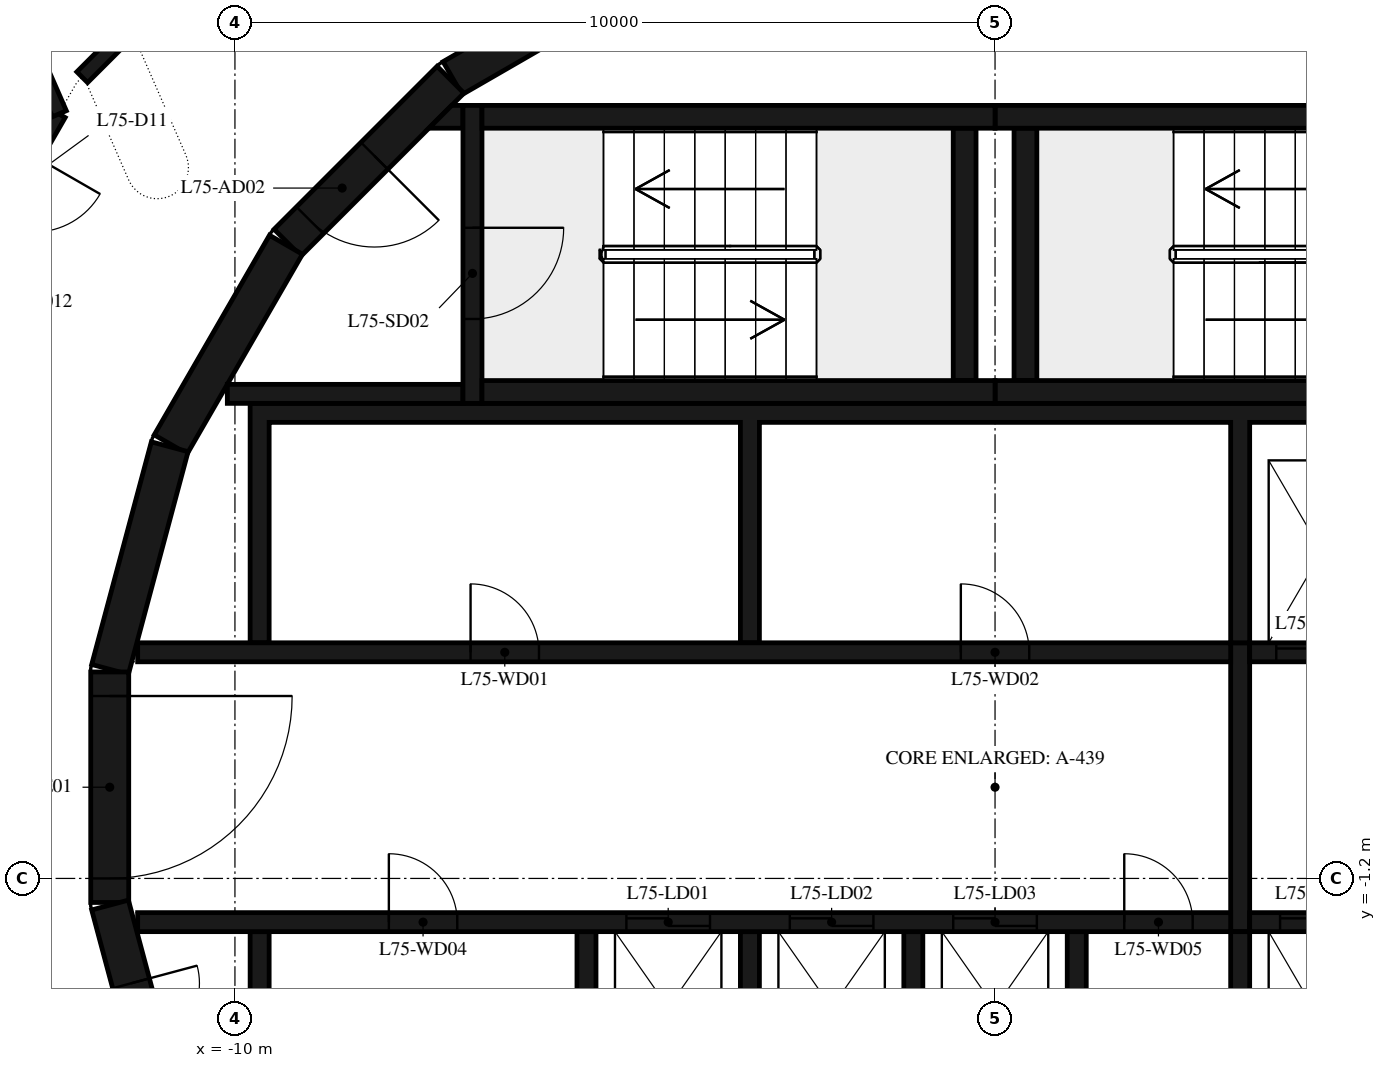
"""IFC4 building model, lengths in metres.
Left out: names, types, materials, properties, quantities, classifications, styles, units other than length and angle.
Written with IfcOpenShell. Run it as: python <this file> out.ifc"""

import sys

from ifc_helpers import new_model, si_unit, direction, frame, frame_2d, origin, place, context, subcontext, project, spatial, polyline, rectangle, outline, extrude, element, fill, save


model = new_model("IFC4")
c1 = context("Model", 3, precision=1e-05, world=origin(), true_north=direction((0.0, 1.0)))
c2 = subcontext(c1, "Body", "Model", "MODEL_VIEW")
j1 = project(units=[si_unit("LENGTHUNIT", "METRE"), si_unit("PLANEANGLEUNIT", "RADIAN")], contexts=[c1])
p1 = place(None, origin())
s1 = spatial("IfcSite", under=j1, at=p1, CompositionType="ELEMENT")
p2 = place(p1, origin())
s2 = spatial("IfcBuilding", under=s1, at=p2, CompositionType="ELEMENT")
p3 = place(p2, frame((0.0, 0.0, 291.4)))
s3 = spatial("IfcBuildingStorey", under=s2, at=p3, CompositionType="ELEMENT", Elevation=291.4)
p4 = place(p3, frame((-4.51, 10.845, 0.0), z_axis=(0.0, 0.0, 1.0), x_axis=(-0.865975092491, -0.500087131594, 0.0)))
e1 = element("IfcWall", 1, at=p4, inside=s3, PredefinedType="SHEAR", context=c2, shape_type="SweptSolid", body=[
    extrude(rectangle(XDim=3.033, YDim=0.5, at=frame_2d((1.516, 0.0))), origin(), (0.0, 0.0, 1.0), 6.35),
])
p5 = place(p3, frame((-7.164, 9.308, 0.0), z_axis=(0.0, 0.0, 1.0), x_axis=(-0.707106781187, -0.707106781187, 0.0)))
e2 = element("IfcWall", 2, at=p5, inside=s3, PredefinedType="SHEAR", context=c2, shape_type="SweptSolid", body=[
    extrude(rectangle(XDim=3.032, YDim=0.5, at=frame_2d((1.516, 0.0))), origin(), (0.0, 0.0, 1.0), 6.35),
])
p6 = place(p5, frame((1.416, 0.0, 0.0)))
e3 = element("IfcOpeningElement", 3, at=p6, cuts=e2, PredefinedType="OPENING", context=c2, shape_type="SweptSolid", body=[
    extrude(rectangle(XDim=1.2, YDim=2.1, at=frame_2d((0.6, 1.05))), frame((0.0, 0.26, 0.0), z_axis=(0.0, -1.0, 0.0), x_axis=(1.0, 0.0, 0.0)), (0.0, 0.0, 1.0), 0.52),
])
for number, where, z_axis, x_axis in (
    (4, (-9.329, 7.137, 0.0), (0.0, 0.0, 1.0), (-0.5, -0.866, 0.0)),
    (5, (-10.858, 4.479, 0.0), (0.0, 0.0, 1.0), (-0.259, -0.966, 0.0)),
):
    element("IfcWall", number, at=place(p3, frame(where, z_axis=z_axis, x_axis=x_axis)), inside=s3, PredefinedType="SHEAR", context=c2, shape_type="SweptSolid", body=[
        extrude(rectangle(XDim=3.033, YDim=0.5, at=frame_2d((1.516, 0.0))), origin(), (0.0, 0.0, 1.0), 6.35),
    ])
p7 = place(p3, frame((-11.647, 1.516, 0.0), z_axis=(0.0, 0.0, 1.0), x_axis=(0.0, -1.0, 0.0)))
e6 = element("IfcWall", 6, at=p7, inside=s3, PredefinedType="SHEAR", context=c2, shape_type="SweptSolid", body=[
    extrude(rectangle(XDim=3.033, YDim=0.5, at=frame_2d((1.516, 0.0))), origin(), (0.0, 0.0, 1.0), 6.35),
])
p8 = place(p7, frame((0.316, 0.0, 0.0)))
e7 = element("IfcOpeningElement", 7, at=p8, cuts=e6, PredefinedType="OPENING", context=c2, shape_type="SweptSolid", body=[
    extrude(rectangle(XDim=2.4, YDim=2.1, at=frame_2d((1.2, 1.05))), frame((0.0, 0.26, 0.0), z_axis=(0.0, -1.0, 0.0), x_axis=(1.0, 0.0, 0.0)), (0.0, 0.0, 1.0), 0.52),
])
p9 = place(p3, frame((-11.643, -1.55, 0.0), z_axis=(0.0, 0.0, 1.0), x_axis=(0.258734743916, -0.965948410781, 0.0)))
e8 = element("IfcWall", 8, at=p9, inside=s3, PredefinedType="SHEAR", context=c2, shape_type="SweptSolid", body=[
    extrude(rectangle(XDim=3.033, YDim=0.5, at=frame_2d((1.516, 0.0))), origin(), (0.0, 0.0, 1.0), 6.35),
])
p10 = place(p9, frame((1.066, 0.0, 0.0)))
e9 = element("IfcOpeningElement", 9, at=p10, cuts=e8, PredefinedType="OPENING", context=c2, shape_type="SweptSolid", body=[
    extrude(rectangle(XDim=0.9, YDim=2.1, at=frame_2d((0.45, 1.05))), frame((0.0, 0.26, 0.0), z_axis=(0.0, -1.0, 0.0), x_axis=(1.0, 0.0, 0.0)), (0.0, 0.0, 1.0), 0.52),
])
for number, where, z_axis, x_axis in (
    (10, (0.0, 5.2, 0.0), (0.0, 0.0, 1.0), (1.0, 0.0, 0.0)),
    (11, (0.0, 8.82, 0.0), (0.0, 0.0, 1.0), (1.0, 0.0, 0.0)),
):
    element("IfcWall", number, at=place(p3, frame(where, z_axis=z_axis, x_axis=x_axis)), inside=s3, PredefinedType="SHEAR", context=c2, shape_type="SweptSolid", body=[
        extrude(rectangle(XDim=6.75, YDim=0.3, at=frame_2d((3.375, 0.0))), origin(), (0.0, 0.0, 1.0), 6.35),
    ])
p11 = place(p3, frame((0.4, 5.35, 0.0), z_axis=(0.0, 0.0, 1.0), x_axis=(0.0, 1.0, 0.0)))
e12 = element("IfcWall", 12, at=p11, inside=s3, PredefinedType="SHEAR", context=c2, shape_type="SweptSolid", body=[
    extrude(rectangle(XDim=3.32, YDim=0.3, at=frame_2d((1.66, 0.0))), origin(), (0.0, 0.0, 1.0), 6.35),
])
for number, where, z_axis, x_axis in (
    (13, (-6.75, 5.2, 0.0), (0.0, 0.0, 1.0), (1.0, 0.0, 0.0)),
    (14, (-6.75, 8.82, 0.0), (0.0, 0.0, 1.0), (1.0, 0.0, 0.0)),
):
    element("IfcWall", number, at=place(p3, frame(where, z_axis=z_axis, x_axis=x_axis)), inside=s3, PredefinedType="SHEAR", context=c2, shape_type="SweptSolid", body=[
        extrude(rectangle(XDim=6.75, YDim=0.3, at=frame_2d((3.375, 0.0))), origin(), (0.0, 0.0, 1.0), 6.35),
    ])
p12 = place(p3, frame((-0.4, 5.35, 0.0), z_axis=(0.0, 0.0, 1.0), x_axis=(0.0, 1.0, 0.0)))
e15 = element("IfcWall", 15, at=p12, inside=s3, PredefinedType="SHEAR", context=c2, shape_type="SweptSolid", body=[
    extrude(rectangle(XDim=3.32, YDim=0.3, at=frame_2d((1.66, 0.0))), origin(), (0.0, 0.0, 1.0), 6.35),
])
p13 = place(p3, frame((-6.875, 8.97, 0.0), z_axis=(0.0, 0.0, 1.0), x_axis=(0.0, -1.0, 0.0)))
e16 = element("IfcWall", 16, at=p13, inside=s3, PredefinedType="SHEAR", context=c2, shape_type="SweptSolid", body=[
    extrude(rectangle(XDim=3.92, YDim=0.25, at=frame_2d((1.96, 0.0))), origin(), (0.0, 0.0, 1.0), 6.35),
])
p14 = place(p13, frame((1.61, 0.0, 0.0)))
e17 = element("IfcOpeningElement", 17, at=p14, cuts=e16, PredefinedType="OPENING", context=c2, shape_type="SweptSolid", body=[
    extrude(rectangle(XDim=1.2, YDim=2.1, at=frame_2d((0.6, 1.05))), frame((0.0, 0.135, 0.0), z_axis=(0.0, -1.0, 0.0), x_axis=(1.0, 0.0, 0.0)), (0.0, 0.0, 1.0), 0.27),
])
p15 = place(p3, frame((-7.0, 5.175, 0.0), z_axis=(0.0, 0.0, 1.0), x_axis=(-1.0, 0.0, 0.0)))
e18 = element("IfcWall", 18, at=p15, inside=s3, PredefinedType="SHEAR", context=c2, shape_type="SweptSolid", body=[
    extrude(rectangle(XDim=3.1, YDim=0.25, at=frame_2d((1.55, 0.0))), origin(), (0.0, 0.0, 1.0), 6.35),
])
p16 = place(p3, origin())
e19 = element("IfcWall", 19, at=p16, inside=s3, PredefinedType="SHEAR", context=c2, shape_type="SweptSolid", body=[
    extrude(outline(polyline([(-7.148, 8.97), (-7.0, 8.97), (-7.0, 8.67), (-7.448, 8.67), (-7.148, 8.97)])), origin(), (0.0, 0.0, 1.0), 6.35),
])
p17 = place(p3, origin())
e20 = element("IfcWall", 20, at=p17, inside=s3, PredefinedType="SHEAR", context=c2, shape_type="SweptSolid", body=[
    extrude(outline(polyline([(-9.8, 1.9), (-9.55, 1.9), (-9.55, 4.8), (-3.35, 4.8), (-3.35, 1.9), (-3.1, 1.9), (-3.1, 4.8), (3.1, 4.8), (3.1, 1.9), (3.35, 1.9), (3.35, 4.8), (5.25, 4.8), (5.25, 1.9), (5.5, 1.9), (5.5, 4.8), (7.4, 4.8), (7.4, 1.9), (7.65, 1.9), (7.65, 4.8), (9.55, 4.8), (9.55, 1.9), (9.8, 1.9), (9.8, 4.8), (9.8, 5.05), (-9.8, 5.05), (-9.8, 4.8), (-9.8, 1.9)])), origin(), (0.0, 0.0, 1.0), 6.35),
])
p18 = place(p3, origin())
e21 = element("IfcWall", 21, at=p18, inside=s3, PredefinedType="SHEAR", context=c2, shape_type="SweptSolid", body=[
    extrude(outline(polyline([(9.8, -5.05), (9.8, -4.8), (9.8, -1.9), (9.55, -1.9), (9.55, -4.8), (7.65, -4.8), (7.65, -1.9), (7.4, -1.9), (7.4, -4.8), (5.5, -4.8), (5.5, -1.9), (5.25, -1.9), (5.25, -4.8), (3.35, -4.8), (3.35, -1.9), (3.1, -1.9), (3.1, -4.8), (1.2, -4.8), (1.2, -1.9), (0.95, -1.9), (0.95, -4.8), (-0.95, -4.8), (-0.95, -1.9), (-1.2, -1.9), (-1.2, -4.8), (-3.1, -4.8), (-3.1, -1.9), (-3.35, -1.9), (-3.35, -4.8), (-5.25, -4.8), (-5.25, -1.9), (-5.5, -1.9), (-5.5, -4.8), (-9.55, -4.8), (-9.55, -1.9), (-9.8, -1.9), (-9.8, -4.8), (-9.8, -5.05), (9.8, -5.05)])), origin(), (0.0, 0.0, 1.0), 6.35),
])
p19 = place(p3, frame((-11.28, 1.775, 0.0), z_axis=(0.0, 0.0, 1.0), x_axis=(1.0, 0.0, 0.0)))
e22 = element("IfcWall", 22, at=p19, inside=s3, PredefinedType="SHEAR", context=c2, shape_type="SweptSolid", body=[
    extrude(rectangle(XDim=14.38, YDim=0.25, at=frame_2d((7.19, 0.0))), origin(), (0.0, 0.0, 1.0), 6.35),
])
p20 = place(p19, frame((4.38, 0.0, 0.0)))
e23 = element("IfcOpeningElement", 23, at=p20, cuts=e22, PredefinedType="OPENING", context=c2, shape_type="SweptSolid", body=[
    extrude(rectangle(XDim=0.9, YDim=2.1, at=frame_2d((0.45, 1.05))), frame((0.0, 0.135, 0.0), z_axis=(0.0, -1.0, 0.0), x_axis=(1.0, 0.0, 0.0)), (0.0, 0.0, 1.0), 0.27),
])
p21 = place(p19, frame((10.83, 0.0, 0.0)))
e24 = element("IfcOpeningElement", 24, at=p21, cuts=e22, PredefinedType="OPENING", context=c2, shape_type="SweptSolid", body=[
    extrude(rectangle(XDim=0.9, YDim=2.1, at=frame_2d((0.45, 1.05))), frame((0.0, 0.135, 0.0), z_axis=(0.0, -1.0, 0.0), x_axis=(1.0, 0.0, 0.0)), (0.0, 0.0, 1.0), 0.27),
])
p22 = place(p3, frame((3.35, 1.775, 0.0), z_axis=(0.0, 0.0, 1.0), x_axis=(1.0, 0.0, 0.0)))
e25 = element("IfcWall", 25, at=p22, inside=s3, PredefinedType="SHEAR", context=c2, shape_type="SweptSolid", body=[
    extrude(rectangle(XDim=7.93, YDim=0.25, at=frame_2d((3.965, 0.0))), origin(), (0.0, 0.0, 1.0), 6.35),
])
p23 = place(p22, frame((0.35, 0.0, 0.0)))
e26 = element("IfcOpeningElement", 26, at=p23, cuts=e25, PredefinedType="OPENING", context=c2, shape_type="SweptSolid", body=[
    extrude(rectangle(XDim=1.2, YDim=2.4, at=frame_2d((0.6, 1.2))), frame((0.0, 0.135, 0.0), z_axis=(0.0, -1.0, 0.0), x_axis=(1.0, 0.0, 0.0)), (0.0, 0.0, 1.0), 0.27),
])
p24 = place(p22, frame((2.5, 0.0, 0.0)))
e27 = element("IfcOpeningElement", 27, at=p24, cuts=e25, PredefinedType="OPENING", context=c2, shape_type="SweptSolid", body=[
    extrude(rectangle(XDim=1.2, YDim=2.4, at=frame_2d((0.6, 1.2))), frame((0.0, 0.135, 0.0), z_axis=(0.0, -1.0, 0.0), x_axis=(1.0, 0.0, 0.0)), (0.0, 0.0, 1.0), 0.27),
])
p25 = place(p22, frame((4.8, 0.0, 0.0)))
e28 = element("IfcOpeningElement", 28, at=p25, cuts=e25, PredefinedType="OPENING", context=c2, shape_type="SweptSolid", body=[
    extrude(rectangle(XDim=0.9, YDim=2.1, at=frame_2d((0.45, 1.05))), frame((0.0, 0.135, 0.0), z_axis=(0.0, -1.0, 0.0), x_axis=(1.0, 0.0, 0.0)), (0.0, 0.0, 1.0), 0.27),
])
p26 = place(p3, frame((-11.28, -1.775, 0.0), z_axis=(0.0, 0.0, 1.0), x_axis=(1.0, 0.0, 0.0)))
e29 = element("IfcWall", 29, at=p26, inside=s3, PredefinedType="SHEAR", context=c2, shape_type="SweptSolid", body=[
    extrude(rectangle(XDim=14.38, YDim=0.25, at=frame_2d((7.19, 0.0))), origin(), (0.0, 0.0, 1.0), 6.35),
])
p27 = place(p26, frame((6.43, 0.0, 0.0)))
e30 = element("IfcOpeningElement", 30, at=p27, cuts=e29, PredefinedType="OPENING", context=c2, shape_type="SweptSolid", body=[
    extrude(rectangle(XDim=1.1, YDim=2.1, at=frame_2d((0.55, 1.05))), frame((0.0, 0.135, 0.0), z_axis=(0.0, -1.0, 0.0), x_axis=(1.0, 0.0, 0.0)), (0.0, 0.0, 1.0), 0.27),
])
p28 = place(p26, frame((8.58, 0.0, 0.0)))
e31 = element("IfcOpeningElement", 31, at=p28, cuts=e29, PredefinedType="OPENING", context=c2, shape_type="SweptSolid", body=[
    extrude(rectangle(XDim=1.1, YDim=2.1, at=frame_2d((0.55, 1.05))), frame((0.0, 0.135, 0.0), z_axis=(0.0, -1.0, 0.0), x_axis=(1.0, 0.0, 0.0)), (0.0, 0.0, 1.0), 0.27),
])
p29 = place(p26, frame((10.73, 0.0, 0.0)))
e32 = element("IfcOpeningElement", 32, at=p29, cuts=e29, PredefinedType="OPENING", context=c2, shape_type="SweptSolid", body=[
    extrude(rectangle(XDim=1.1, YDim=2.1, at=frame_2d((0.55, 1.05))), frame((0.0, 0.135, 0.0), z_axis=(0.0, -1.0, 0.0), x_axis=(1.0, 0.0, 0.0)), (0.0, 0.0, 1.0), 0.27),
])
p30 = place(p26, frame((3.305, 0.0, 0.0)))
e33 = element("IfcOpeningElement", 33, at=p30, cuts=e29, PredefinedType="OPENING", context=c2, shape_type="SweptSolid", body=[
    extrude(rectangle(XDim=0.9, YDim=2.1, at=frame_2d((0.45, 1.05))), frame((0.0, 0.135, 0.0), z_axis=(0.0, -1.0, 0.0), x_axis=(1.0, 0.0, 0.0)), (0.0, 0.0, 1.0), 0.27),
])
p31 = place(p26, frame((12.98, 0.0, 0.0)))
e34 = element("IfcOpeningElement", 34, at=p31, cuts=e29, PredefinedType="OPENING", context=c2, shape_type="SweptSolid", body=[
    extrude(rectangle(XDim=0.9, YDim=2.1, at=frame_2d((0.45, 1.05))), frame((0.0, 0.135, 0.0), z_axis=(0.0, -1.0, 0.0), x_axis=(1.0, 0.0, 0.0)), (0.0, 0.0, 1.0), 0.27),
])
p32 = place(p3, frame((3.35, -1.775, 0.0), z_axis=(0.0, 0.0, 1.0), x_axis=(1.0, 0.0, 0.0)))
e35 = element("IfcWall", 35, at=p32, inside=s3, PredefinedType="SHEAR", context=c2, shape_type="SweptSolid", body=[
    extrude(rectangle(XDim=7.93, YDim=0.25, at=frame_2d((3.965, 0.0))), origin(), (0.0, 0.0, 1.0), 6.35),
])
p33 = place(p32, frame((0.4, 0.0, 0.0)))
e36 = element("IfcOpeningElement", 36, at=p33, cuts=e35, PredefinedType="OPENING", context=c2, shape_type="SweptSolid", body=[
    extrude(rectangle(XDim=1.1, YDim=2.4, at=frame_2d((0.55, 1.2))), frame((0.0, 0.135, 0.0), z_axis=(0.0, -1.0, 0.0), x_axis=(1.0, 0.0, 0.0)), (0.0, 0.0, 1.0), 0.27),
])
p34 = place(p32, frame((2.55, 0.0, 0.0)))
e37 = element("IfcOpeningElement", 37, at=p34, cuts=e35, PredefinedType="OPENING", context=c2, shape_type="SweptSolid", body=[
    extrude(rectangle(XDim=1.1, YDim=2.4, at=frame_2d((0.55, 1.2))), frame((0.0, 0.135, 0.0), z_axis=(0.0, -1.0, 0.0), x_axis=(1.0, 0.0, 0.0)), (0.0, 0.0, 1.0), 0.27),
])
p35 = place(p32, frame((4.7, 0.0, 0.0)))
e38 = element("IfcOpeningElement", 38, at=p35, cuts=e35, PredefinedType="OPENING", context=c2, shape_type="SweptSolid", body=[
    extrude(rectangle(XDim=1.1, YDim=2.4, at=frame_2d((0.55, 1.2))), frame((0.0, 0.135, 0.0), z_axis=(0.0, -1.0, 0.0), x_axis=(1.0, 0.0, 0.0)), (0.0, 0.0, 1.0), 0.27),
])
p36 = place(p3, frame((3.225, -1.9, 0.0), z_axis=(0.0, 0.0, 1.0), x_axis=(0.0, 1.0, 0.0)))
e39 = element("IfcWall", 39, at=p36, inside=s3, PredefinedType="SHEAR", context=c2, shape_type="SweptSolid", body=[
    extrude(rectangle(XDim=3.8, YDim=0.25, at=frame_2d((1.9, 0.0))), origin(), (0.0, 0.0, 1.0), 6.35),
])
p37 = place(p3, frame((-12.32, 8.86, 0.0), z_axis=(0.0, 0.0, 1.0), x_axis=(-0.498886625959, -0.866667257048, 0.0)))
e40 = element("IfcWall", 40, at=p37, inside=s3, PredefinedType="PARTITIONING", context=c2, shape_type="SweptSolid", body=[
    extrude(rectangle(XDim=2.285, YDim=0.2, at=frame_2d((1.143, 0.0))), origin(), (0.0, 0.0, 1.0), 6.35),
])
p38 = place(p37, frame((0.642, 0.0, 0.0)))
e41 = element("IfcOpeningElement", 41, at=p38, cuts=e40, PredefinedType="OPENING", context=c2, shape_type="SweptSolid", body=[
    extrude(rectangle(XDim=1.0, YDim=2.1, at=frame_2d((0.5, 1.05))), frame((0.0, 0.11, 0.0), z_axis=(0.0, -1.0, 0.0), x_axis=(1.0, 0.0, 0.0)), (0.0, 0.0, 1.0), 0.22),
])
p39 = place(p3, frame((-12.31, 8.86, 0.0), z_axis=(0.0, 0.0, 1.0), x_axis=(-0.400829604246, 0.916152622853, 0.0)))
e42 = element("IfcWall", 42, at=p39, inside=s3, PredefinedType="PARTITIONING", context=c2, shape_type="SweptSolid", body=[
    extrude(rectangle(XDim=3.567, YDim=0.2, at=frame_2d((1.784, 0.0))), origin(), (0.0, 0.0, 1.0), 6.35),
])
p40 = place(p3, frame((-12.009, 9.341, 0.0), z_axis=(0.0, 0.0, 1.0), x_axis=(0.707106781187, 0.707106781187, 0.0)))
e43 = element("IfcWall", 43, at=p40, inside=s3, PredefinedType="PARTITIONING", context=c2, shape_type="SweptSolid", body=[
    extrude(rectangle(XDim=3.874, YDim=0.2, at=frame_2d((1.937, 0.0))), origin(), (0.0, 0.0, 1.0), 6.35),
])
p41 = place(p14, origin())
e44 = element("IfcDoor", 44, at=p41, inside=s3, OperationType="SINGLE_SWING_LEFT", PredefinedType="DOOR", context=c2, shape_type="SweptSolid", body=[
    extrude(rectangle(XDim=1.2, YDim=2.1, at=frame_2d((0.6, 1.05))), frame((0.0, 0.025, 0.0), z_axis=(0.0, -1.0, 0.0), x_axis=(1.0, 0.0, 0.0)), (0.0, 0.0, 1.0), 0.05),
])
fill(e17, e44)
p42 = place(p6, origin())
e45 = element("IfcDoor", 45, at=p42, inside=s3, OperationType="SINGLE_SWING_RIGHT", PredefinedType="DOOR", context=c2, shape_type="SweptSolid", body=[
    extrude(rectangle(XDim=1.2, YDim=2.1, at=frame_2d((0.6, 1.05))), frame((0.0, 0.025, 0.0), z_axis=(0.0, -1.0, 0.0), x_axis=(1.0, 0.0, 0.0)), (0.0, 0.0, 1.0), 0.05),
])
fill(e3, e45)
p43 = place(p8, origin())
e46 = element("IfcDoor", 46, at=p43, inside=s3, OperationType="DOUBLE_DOOR_SINGLE_SWING", PredefinedType="DOOR", context=c2, shape_type="SweptSolid", body=[
    extrude(rectangle(XDim=2.4, YDim=2.1, at=frame_2d((1.2, 1.05))), frame((0.0, 0.025, 0.0), z_axis=(0.0, -1.0, 0.0), x_axis=(1.0, 0.0, 0.0)), (0.0, 0.0, 1.0), 0.05),
])
fill(e7, e46)
p44 = place(p23, origin())
e47 = element("IfcDoor", 47, at=p44, inside=s3, OperationType="DOUBLE_DOOR_SLIDING", PredefinedType="DOOR", context=c2, shape_type="SweptSolid", body=[
    extrude(rectangle(XDim=1.2, YDim=2.4, at=frame_2d((0.6, 1.2))), frame((0.0, 0.025, 0.0), z_axis=(0.0, -1.0, 0.0), x_axis=(1.0, 0.0, 0.0)), (0.0, 0.0, 1.0), 0.05),
])
fill(e26, e47)
p45 = place(p27, origin())
e48 = element("IfcDoor", 48, at=p45, inside=s3, OperationType="DOUBLE_DOOR_SLIDING", PredefinedType="DOOR", context=c2, shape_type="SweptSolid", body=[
    extrude(rectangle(XDim=1.1, YDim=2.1, at=frame_2d((0.55, 1.05))), frame((0.0, 0.025, 0.0), z_axis=(0.0, -1.0, 0.0), x_axis=(1.0, 0.0, 0.0)), (0.0, 0.0, 1.0), 0.05),
])
fill(e30, e48)
p46 = place(p28, origin())
e49 = element("IfcDoor", 49, at=p46, inside=s3, OperationType="DOUBLE_DOOR_SLIDING", PredefinedType="DOOR", context=c2, shape_type="SweptSolid", body=[
    extrude(rectangle(XDim=1.1, YDim=2.1, at=frame_2d((0.55, 1.05))), frame((0.0, 0.025, 0.0), z_axis=(0.0, -1.0, 0.0), x_axis=(1.0, 0.0, 0.0)), (0.0, 0.0, 1.0), 0.05),
])
fill(e31, e49)
p47 = place(p29, origin())
e50 = element("IfcDoor", 50, at=p47, inside=s3, OperationType="DOUBLE_DOOR_SLIDING", PredefinedType="DOOR", context=c2, shape_type="SweptSolid", body=[
    extrude(rectangle(XDim=1.1, YDim=2.1, at=frame_2d((0.55, 1.05))), frame((0.0, 0.025, 0.0), z_axis=(0.0, -1.0, 0.0), x_axis=(1.0, 0.0, 0.0)), (0.0, 0.0, 1.0), 0.05),
])
fill(e32, e50)
p48 = place(p33, origin())
e51 = element("IfcDoor", 51, at=p48, inside=s3, OperationType="DOUBLE_DOOR_SLIDING", PredefinedType="DOOR", context=c2, shape_type="SweptSolid", body=[
    extrude(rectangle(XDim=1.1, YDim=2.4, at=frame_2d((0.55, 1.2))), frame((0.0, 0.025, 0.0), z_axis=(0.0, -1.0, 0.0), x_axis=(1.0, 0.0, 0.0)), (0.0, 0.0, 1.0), 0.05),
])
fill(e36, e51)
p49 = place(p20, origin())
e52 = element("IfcDoor", 52, at=p49, inside=s3, OperationType="SINGLE_SWING_LEFT", PredefinedType="DOOR", context=c2, shape_type="SweptSolid", body=[
    extrude(rectangle(XDim=0.9, YDim=2.1, at=frame_2d((0.45, 1.05))), frame((0.0, 0.025, 0.0), z_axis=(0.0, -1.0, 0.0), x_axis=(1.0, 0.0, 0.0)), (0.0, 0.0, 1.0), 0.05),
])
fill(e23, e52)
p50 = place(p21, origin())
e53 = element("IfcDoor", 53, at=p50, inside=s3, OperationType="SINGLE_SWING_RIGHT", PredefinedType="DOOR", context=c2, shape_type="SweptSolid", body=[
    extrude(rectangle(XDim=0.9, YDim=2.1, at=frame_2d((0.45, 1.05))), frame((0.0, 0.025, 0.0), z_axis=(0.0, -1.0, 0.0), x_axis=(1.0, 0.0, 0.0)), (0.0, 0.0, 1.0), 0.05),
])
fill(e24, e53)
p51 = place(p30, origin())
e54 = element("IfcDoor", 54, at=p51, inside=s3, OperationType="SINGLE_SWING_RIGHT", PredefinedType="DOOR", context=c2, shape_type="SweptSolid", body=[
    extrude(rectangle(XDim=0.9, YDim=2.1, at=frame_2d((0.45, 1.05))), frame((0.0, 0.025, 0.0), z_axis=(0.0, -1.0, 0.0), x_axis=(1.0, 0.0, 0.0)), (0.0, 0.0, 1.0), 0.05),
])
fill(e33, e54)
p52 = place(p31, origin())
e55 = element("IfcDoor", 55, at=p52, inside=s3, OperationType="SINGLE_SWING_LEFT", PredefinedType="DOOR", context=c2, shape_type="SweptSolid", body=[
    extrude(rectangle(XDim=0.9, YDim=2.1, at=frame_2d((0.45, 1.05))), frame((0.0, 0.025, 0.0), z_axis=(0.0, -1.0, 0.0), x_axis=(1.0, 0.0, 0.0)), (0.0, 0.0, 1.0), 0.05),
])
fill(e34, e55)
p53 = place(p10, origin())
e56 = element("IfcDoor", 56, at=p53, inside=s3, OperationType="SINGLE_SWING_RIGHT", PredefinedType="DOOR", context=c2, shape_type="SweptSolid", body=[
    extrude(rectangle(XDim=0.9, YDim=2.1, at=frame_2d((0.45, 1.05))), frame((0.0, 0.025, 0.0), z_axis=(0.0, -1.0, 0.0), x_axis=(1.0, 0.0, 0.0)), (0.0, 0.0, 1.0), 0.05),
])
fill(e9, e56)
save(model, sys.argv[1])
